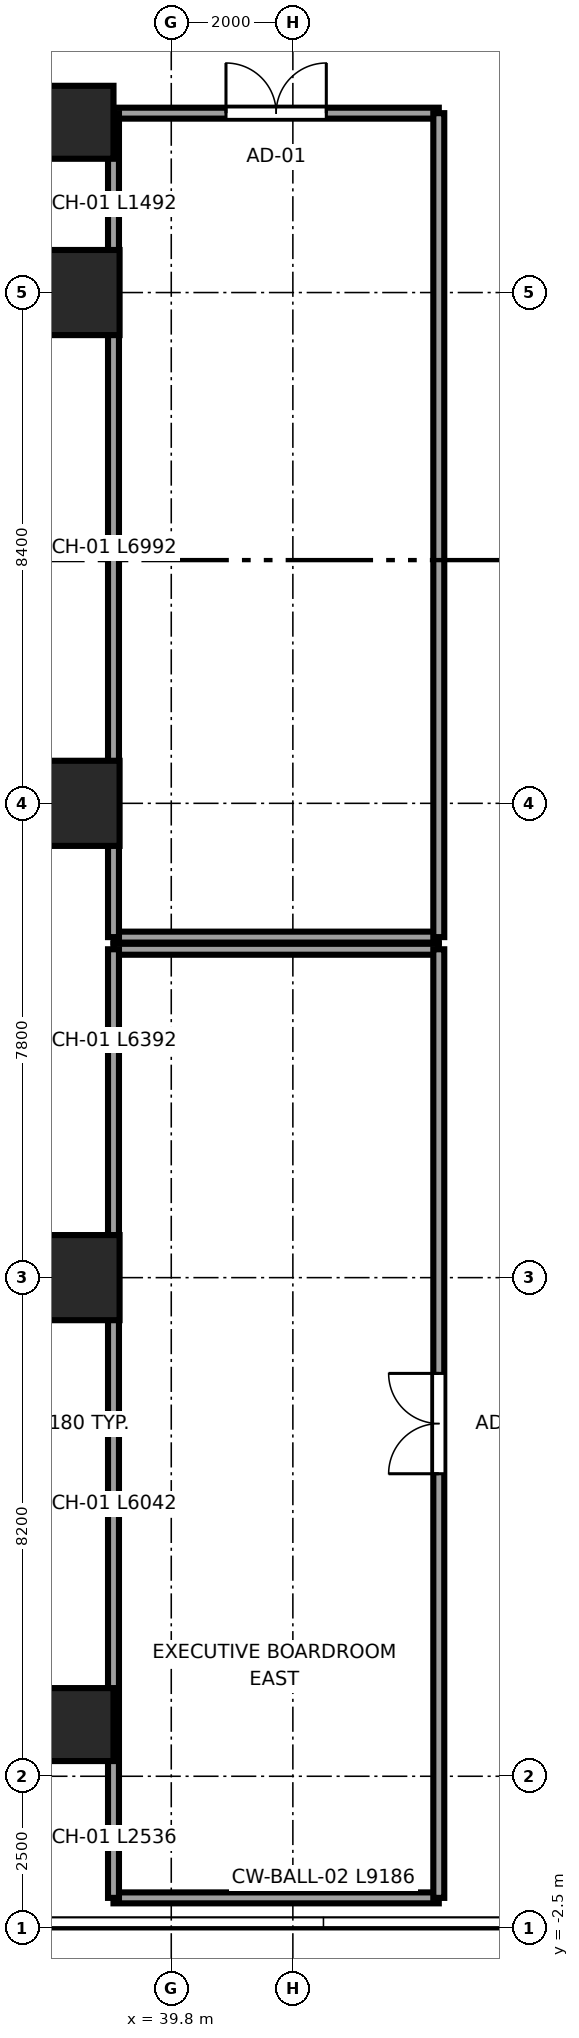
"""IFC4 building model, lengths in metres.
Left out: names, types, materials, properties, quantities, classifications, styles, units other than length and angle.
Written with IfcOpenShell. Run it as: python <this file> out.ifc"""

import sys

from ifc_helpers import new_model, si_unit, direction, frame, frame_2d, origin, origin_2d, place, context, subcontext, project, spatial, rectangle, circle, extrude, source, transform, mapped, element, fill, save


model = new_model("IFC4")
c1 = context("Model", 3, precision=1e-05, world=origin(), true_north=direction((0.0, 1.0)))
c2 = subcontext(c1, "Body", "Model", "MODEL_VIEW")
j1 = project(units=[si_unit("LENGTHUNIT", "METRE"), si_unit("PLANEANGLEUNIT", "RADIAN")], contexts=[c1])
p1 = place(None, origin())
s1 = spatial("IfcSite", under=j1, at=p1, CompositionType="ELEMENT")
p2 = place(p1, origin())
s2 = spatial("IfcBuilding", under=s1, at=p2, CompositionType="ELEMENT")
p3 = place(p2, frame((0.0, 0.0, 11.0)))
s3 = spatial("IfcBuildingStorey", under=s2, at=p3, CompositionType="ELEMENT", Elevation=11.0)
m1 = source(origin(), c2, "Body", "SweptSolid", [
    extrude(circle(Radius=0.6, at=origin_2d()), origin(), (0.0, 0.0, 1.0), 5.0),
])
p4 = place(p3, frame((38.25, 0.85, 0.0), z_axis=(0.0, 0.0, 1.0), x_axis=(1.0, 0.0, 0.0)))
e1 = element("IfcColumn", 1, at=p4, inside=s3, PredefinedType="COLUMN", context=c2, shape_type="MappedRepresentation", body=[
    mapped(m1, transform((0.0, 0.0, 0.0), x_axis=(1.0, 0.0, 0.0), y_axis=(0.0, 1.0, 0.0), z_axis=(0.0, 0.0, 1.0), scale=1.0)),
])
m2 = source(origin(), c2, "Body", "SweptSolid", [
    extrude(rectangle(XDim=1.4, YDim=1.4, at=origin_2d()), origin(), (0.0, 0.0, 1.0), 5.0),
])
for number, where, z_axis, x_axis in (
    (2, (38.25, 8.2, 0.0), (0.0, 0.0, 1.0), (1.0, 0.0, 0.0)),
    (3, (38.25, 16.0, 0.0), (0.0, 0.0, 1.0), (1.0, 0.0, 0.0)),
    (4, (38.25, 24.4, 0.0), (0.0, 0.0, 1.0), (1.0, 0.0, 0.0)),
):
    element("IfcColumn", number, at=place(p3, frame(where, z_axis=z_axis, x_axis=x_axis)), inside=s3, PredefinedType="COLUMN", context=c2, shape_type="MappedRepresentation", body=[
        mapped(m2, transform((0.0, 0.0, 0.0), x_axis=(1.0, 0.0, 0.0), y_axis=(0.0, 1.0, 0.0), z_axis=(0.0, 0.0, 1.0), scale=1.0)),
    ])
p5 = place(p3, frame((38.25, 27.2, 0.0), z_axis=(0.0, 0.0, 1.0), x_axis=(1.0, 0.0, 0.0)))
e5 = element("IfcColumn", 5, at=p5, inside=s3, PredefinedType="COLUMN", context=c2, shape_type="MappedRepresentation", body=[
    mapped(m1, transform((0.0, 0.0, 0.0), x_axis=(1.0, 0.0, 0.0), y_axis=(0.0, 1.0, 0.0), z_axis=(0.0, 0.0, 1.0), scale=1.0)),
])
p6 = place(p3, frame((38.85, -2.0, 0.0), z_axis=(0.0, 0.0, 1.0), x_axis=(1.0, 0.0, 0.0)))
e6 = element("IfcWall", 6, at=p6, inside=s3, PredefinedType="PARTITIONING", context=c2, shape_type="SweptSolid", body=[
    extrude(rectangle(XDim=5.35, YDim=0.18, at=frame_2d((2.675, 0.0))), origin(), (0.0, 0.0, 1.0), 4.03),
])
p7 = place(p3, frame((38.85, 13.6, 0.0), z_axis=(0.0, 0.0, 1.0), x_axis=(1.0, 0.0, 0.0)))
e7 = element("IfcWall", 7, at=p7, inside=s3, PredefinedType="PARTITIONING", context=c2, shape_type="SweptSolid", body=[
    extrude(rectangle(XDim=5.35, YDim=0.18, at=frame_2d((2.675, 0.0))), origin(), (0.0, 0.0, 1.0), 4.74),
])
p8 = place(p3, frame((38.85, -2.0, 0.0), z_axis=(0.0, 0.0, 1.0), x_axis=(0.0, 1.0, 0.0)))
e8 = element("IfcWall", 8, at=p8, inside=s3, PredefinedType="PARTITIONING", context=c2, shape_type="SweptSolid", body=[
    extrude(rectangle(XDim=15.6, YDim=0.18, at=frame_2d((7.8, 0.0))), origin(), (0.0, 0.0, 1.0), 4.74),
])
p9 = place(p3, frame((44.2, -2.0, 0.0), z_axis=(0.0, 0.0, 1.0), x_axis=(0.0, 1.0, 0.0)))
e9 = element("IfcWall", 9, at=p9, inside=s3, PredefinedType="PARTITIONING", context=c2, shape_type="SweptSolid", body=[
    extrude(rectangle(XDim=15.6, YDim=0.18, at=frame_2d((7.8, 0.0))), origin(), (0.0, 0.0, 1.0), 4.276),
])
p10 = place(p9, frame((6.975, 0.0, 0.0)))
e10 = element("IfcOpeningElement", 10, at=p10, cuts=e9, PredefinedType="OPENING", context=c2, shape_type="SweptSolid", body=[
    extrude(rectangle(XDim=1.65, YDim=2.15, at=frame_2d((0.825, 1.075))), frame((0.0, 0.1, 0.0), z_axis=(0.0, -1.0, 0.0), x_axis=(1.0, 0.0, 0.0)), (0.0, 0.0, 1.0), 0.2),
])
p11 = place(p3, frame((38.85, 13.8, 0.0), z_axis=(0.0, 0.0, 1.0), x_axis=(1.0, 0.0, 0.0)))
e11 = element("IfcWall", 11, at=p11, inside=s3, PredefinedType="PARTITIONING", context=c2, shape_type="SweptSolid", body=[
    extrude(rectangle(XDim=5.35, YDim=0.18, at=frame_2d((2.675, 0.0))), origin(), (0.0, 0.0, 1.0), 4.74),
])
p12 = place(p3, frame((38.85, 27.35, 0.0), z_axis=(0.0, 0.0, 1.0), x_axis=(1.0, 0.0, 0.0)))
e12 = element("IfcWall", 12, at=p12, inside=s3, PredefinedType="PARTITIONING", context=c2, shape_type="SweptSolid", body=[
    extrude(rectangle(XDim=5.35, YDim=0.18, at=frame_2d((2.675, 0.0))), origin(), (0.0, 0.0, 1.0), 4.74),
])
p13 = place(p12, frame((1.85, 0.0, 0.0)))
e13 = element("IfcOpeningElement", 13, at=p13, cuts=e12, PredefinedType="OPENING", context=c2, shape_type="SweptSolid", body=[
    extrude(rectangle(XDim=1.65, YDim=2.15, at=frame_2d((0.825, 1.075))), frame((0.0, 0.1, 0.0), z_axis=(0.0, -1.0, 0.0), x_axis=(1.0, 0.0, 0.0)), (0.0, 0.0, 1.0), 0.2),
])
p14 = place(p3, frame((38.85, 13.8, 0.0), z_axis=(0.0, 0.0, 1.0), x_axis=(0.0, 1.0, 0.0)))
e14 = element("IfcWall", 14, at=p14, inside=s3, PredefinedType="PARTITIONING", context=c2, shape_type="SweptSolid", body=[
    extrude(rectangle(XDim=13.55, YDim=0.18, at=frame_2d((6.775, 0.0))), origin(), (0.0, 0.0, 1.0), 4.74),
])
p15 = place(p3, frame((44.2, 13.8, 0.0), z_axis=(0.0, 0.0, 1.0), x_axis=(0.0, 1.0, 0.0)))
e15 = element("IfcWall", 15, at=p15, inside=s3, PredefinedType="PARTITIONING", context=c2, shape_type="SweptSolid", body=[
    extrude(rectangle(XDim=13.55, YDim=0.18, at=frame_2d((6.775, 0.0))), origin(), (0.0, 0.0, 1.0), 4.276),
])
m3 = source(origin(), c2, "Body", "SweptSolid", [
    extrude(rectangle(XDim=1.65, YDim=2.15, at=frame_2d((0.825, 1.075))), frame((0.0, 0.025, 0.0), z_axis=(0.0, -1.0, 0.0), x_axis=(1.0, 0.0, 0.0)), (0.0, 0.0, 1.0), 0.05),
])
p16 = place(p10, origin())
e16 = element("IfcDoor", 16, at=p16, inside=s3, OperationType="DOUBLE_DOOR_SINGLE_SWING", PredefinedType="DOOR", context=c2, shape_type="MappedRepresentation", body=[
    mapped(m3, transform((0.0, 0.0, 0.0), x_axis=(1.0, 0.0, 0.0), y_axis=(0.0, 1.0, 0.0), z_axis=(0.0, 0.0, 1.0), scale=1.0)),
])
fill(e10, e16)
p17 = place(p13, origin())
e17 = element("IfcDoor", 17, at=p17, inside=s3, OperationType="DOUBLE_DOOR_SINGLE_SWING", PredefinedType="DOOR", context=c2, shape_type="MappedRepresentation", body=[
    mapped(m3, transform((0.0, 0.0, 0.0), x_axis=(1.0, 0.0, 0.0), y_axis=(0.0, 1.0, 0.0), z_axis=(0.0, 0.0, 1.0), scale=1.0)),
])
fill(e13, e17)
save(model, sys.argv[1])
